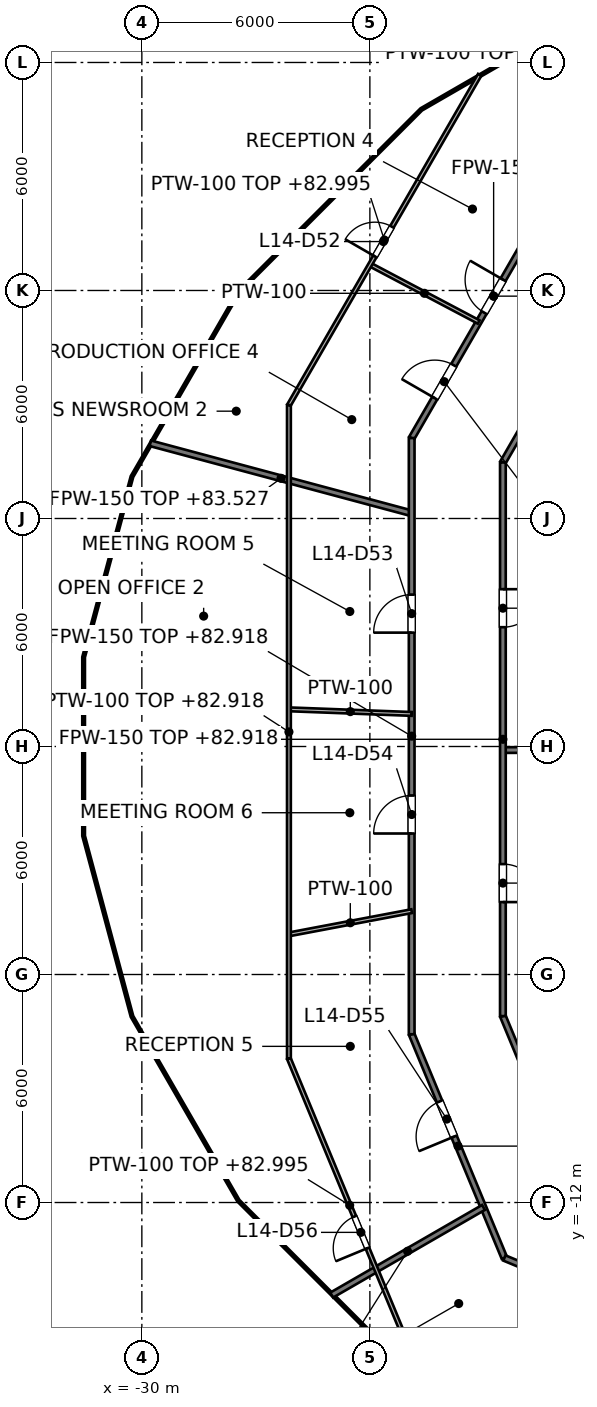
"""IFC4 building model, lengths in metres.
Left out: names, types, materials, properties, quantities, classifications, styles, units other than length and angle.
Written with IfcOpenShell. Run it as: python <this file> out.ifc"""

import sys

from ifc_helpers import new_model, si_unit, direction, frame, frame_2d, origin, place, context, subcontext, project, spatial, rectangle, extrude, element, fill, save


model = new_model("IFC4")
c1 = context("Model", 3, precision=1e-05, world=origin(), true_north=direction((0.0, 1.0)))
c2 = subcontext(c1, "Body", "Model", "MODEL_VIEW")
j1 = project(units=[si_unit("LENGTHUNIT", "METRE"), si_unit("PLANEANGLEUNIT", "RADIAN")], contexts=[c1])
p1 = place(None, origin())
s1 = spatial("IfcSite", under=j1, at=p1, CompositionType="ELEMENT")
p2 = place(p1, origin())
s2 = spatial("IfcBuilding", under=s1, at=p2, CompositionType="ELEMENT")
p3 = place(p2, frame((0.0, 0.0, 79.8)))
s3 = spatial("IfcBuildingStorey", under=s2, at=p3, CompositionType="ELEMENT", Elevation=79.8)
p4 = place(p3, frame((-22.9, -7.572, 0.0), z_axis=(0.0, 0.0, 1.0), x_axis=(0.382860357704, -0.923806227788, 0.0)))
e1 = element("IfcWall", 1, at=p4, inside=s3, PredefinedType="PARTITIONING", context=c2, shape_type="SweptSolid", body=[
    extrude(rectangle(XDim=6.374, YDim=0.15, at=frame_2d((3.187, 0.0))), origin(), (0.0, 0.0, 1.0), 3.195),
])
p5 = place(p4, frame((1.916, 0.0, 0.0)))
e2 = element("IfcOpeningElement", 2, at=p5, cuts=e1, PredefinedType="OPENING", context=c2, shape_type="SweptSolid", body=[
    extrude(rectangle(XDim=1.0, YDim=2.1, at=frame_2d((0.5, 1.05))), frame((0.0, 0.075, 0.0), z_axis=(0.0, -1.0, 0.0), x_axis=(1.0, 0.0, 0.0)), (0.0, 0.0, 1.0), 0.15),
])
p6 = place(p3, frame((-20.5, -7.095, 0.0), z_axis=(0.0, 0.0, 1.0), x_axis=(0.382860567438, -0.923806140866, 0.0)))
e3 = element("IfcWall", 3, at=p6, inside=s3, PredefinedType="PARTITIONING", context=c2, shape_type="SweptSolid", body=[
    extrude(rectangle(XDim=4.902, YDim=0.15, at=frame_2d((2.451, 0.0))), origin(), (0.0, 0.0, 1.0), 3.195),
])
p7 = place(p3, frame((-20.46, -13.46, 0.0), z_axis=(0.0, 0.0, 1.0), x_axis=(0.923801547606, -0.382871650349, 0.0)))
e4 = element("IfcWall", 4, at=p7, inside=s3, PredefinedType="PARTITIONING", context=c2, shape_type="SweptSolid", body=[
    extrude(rectangle(XDim=6.415, YDim=0.15, at=frame_2d((3.208, 0.0))), origin(), (0.0, 0.0, 1.0), 3.195),
])
p8 = place(p7, frame((2.707, 0.0, 0.0)))
e5 = element("IfcOpeningElement", 5, at=p8, cuts=e4, PredefinedType="OPENING", context=c2, shape_type="SweptSolid", body=[
    extrude(rectangle(XDim=1.0, YDim=2.1, at=frame_2d((0.5, 1.05))), frame((0.0, 0.075, 0.0), z_axis=(0.0, -1.0, 0.0), x_axis=(1.0, 0.0, 0.0)), (0.0, 0.0, 1.0), 0.15),
])
p9 = place(p3, frame((-29.777, 7.979, 0.0), z_axis=(0.0, 0.0, 1.0), x_axis=(0.965924632989, -0.25882349852, 0.0)))
e6 = element("IfcWall", 6, at=p9, inside=s3, PredefinedType="PARTITIONING", context=c2, shape_type="SweptSolid", body=[
    extrude(rectangle(XDim=7.12, YDim=0.15, at=frame_2d((3.56, 0.0))), origin(), (0.0, 0.0, 1.0), 3.727),
])
p10 = place(p3, frame((-20.5, -0.094, 0.0), z_axis=(0.0, 0.0, 1.0), x_axis=(0.999990148138, 0.004438876723, 0.0)))
e7 = element("IfcWall", 7, at=p10, inside=s3, PredefinedType="PARTITIONING", context=c2, shape_type="SweptSolid", body=[
    extrude(rectangle(XDim=5.5, YDim=0.15, at=frame_2d((2.75, 0.0))), origin(), (0.0, 0.0, 1.0), 3.195),
])
p11 = place(p3, frame((-25.005, -14.436, 0.0), z_axis=(0.0, 0.0, 1.0), x_axis=(0.866022493768, 0.500005040262, 0.0)))
e8 = element("IfcWall", 8, at=p11, inside=s3, PredefinedType="PARTITIONING", context=c2, shape_type="SweptSolid", body=[
    extrude(rectangle(XDim=4.612, YDim=0.15, at=frame_2d((2.306, 0.0))), origin(), (0.0, 0.0, 1.0), 3.352),
])
p12 = place(p3, frame((-20.5, 7.474, 0.0), z_axis=(0.0, 0.0, 1.0), x_axis=(0.500012665616, 0.866018091164, 0.0)))
e9 = element("IfcWall", 9, at=p12, inside=s3, PredefinedType="PARTITIONING", context=c2, shape_type="SweptSolid", body=[
    extrude(rectangle(XDim=6.602, YDim=0.15, at=frame_2d((3.301, 0.0))), origin(), (0.0, 0.0, 1.0), 3.195),
])
p13 = place(p12, frame((2.803, 0.0, 0.0)))
e10 = element("IfcOpeningElement", 10, at=p13, cuts=e9, PredefinedType="OPENING", context=c2, shape_type="SweptSolid", body=[
    extrude(rectangle(XDim=1.0, YDim=2.1, at=frame_2d((0.5, 1.05))), frame((0.0, 0.075, 0.0), z_axis=(0.0, -1.0, 0.0), x_axis=(1.0, 0.0, 0.0)), (0.0, 0.0, 1.0), 0.15),
])
p14 = place(p3, frame((-22.9, 8.117, 0.0), z_axis=(0.0, 0.0, 1.0), x_axis=(0.499983791763, 0.866034761412, 0.0)))
e11 = element("IfcWall", 11, at=p14, inside=s3, PredefinedType="PARTITIONING", context=c2, shape_type="SweptSolid", body=[
    extrude(rectangle(XDim=8.626, YDim=0.15, at=frame_2d((4.313, 0.0))), origin(), (0.0, 0.0, 1.0), 3.195),
])
p15 = place(p14, frame((3.812, 0.0, 0.0)))
e12 = element("IfcOpeningElement", 12, at=p15, cuts=e11, PredefinedType="OPENING", context=c2, shape_type="SweptSolid", body=[
    extrude(rectangle(XDim=1.0, YDim=2.1, at=frame_2d((0.5, 1.05))), frame((0.0, 0.075, 0.0), z_axis=(0.0, -1.0, 0.0), x_axis=(1.0, 0.0, 0.0)), (0.0, 0.0, 1.0), 0.15),
])
p16 = place(p14, frame((1.213, 0.0, 0.0)))
e13 = element("IfcOpeningElement", 13, at=p16, cuts=e11, PredefinedType="OPENING", context=c2, shape_type="SweptSolid", body=[
    extrude(rectangle(XDim=1.0, YDim=2.1, at=frame_2d((0.5, 1.05))), frame((0.0, 0.075, 0.0), z_axis=(0.0, -1.0, 0.0), x_axis=(1.0, 0.0, 0.0)), (0.0, 0.0, 1.0), 0.15),
])
p17 = place(p3, frame((-20.5, -7.095, 0.0), z_axis=(0.0, 0.0, 1.0), x_axis=(0.0, 1.0, 0.0)))
e14 = element("IfcWall", 14, at=p17, inside=s3, PredefinedType="PARTITIONING", context=c2, shape_type="SweptSolid", body=[
    extrude(rectangle(XDim=14.569, YDim=0.15, at=frame_2d((7.285, 0.0))), origin(), (0.0, 0.0, 1.0), 3.118),
])
p18 = place(p17, frame((10.234, 0.0, 0.0)))
e15 = element("IfcOpeningElement", 15, at=p18, cuts=e14, PredefinedType="OPENING", context=c2, shape_type="SweptSolid", body=[
    extrude(rectangle(XDim=1.0, YDim=2.1, at=frame_2d((0.5, 1.05))), frame((0.0, 0.075, 0.0), z_axis=(0.0, -1.0, 0.0), x_axis=(1.0, 0.0, 0.0)), (0.0, 0.0, 1.0), 0.15),
])
p19 = place(p17, frame((3.0, 0.0, 0.0)))
e16 = element("IfcOpeningElement", 16, at=p19, cuts=e14, PredefinedType="OPENING", context=c2, shape_type="SweptSolid", body=[
    extrude(rectangle(XDim=1.0, YDim=2.1, at=frame_2d((0.5, 1.05))), frame((0.0, 0.075, 0.0), z_axis=(0.0, -1.0, 0.0), x_axis=(1.0, 0.0, 0.0)), (0.0, 0.0, 1.0), 0.15),
])
p20 = place(p3, frame((-22.9, -7.572, 0.0), z_axis=(0.0, 0.0, 1.0), x_axis=(0.0, 1.0, 0.0)))
e17 = element("IfcWall", 17, at=p20, inside=s3, PredefinedType="PARTITIONING", context=c2, shape_type="SweptSolid", body=[
    extrude(rectangle(XDim=15.689, YDim=0.15, at=frame_2d((7.844, 0.0))), origin(), (0.0, 0.0, 1.0), 3.118),
])
p21 = place(p20, frame((10.569, 0.0, 0.0)))
e18 = element("IfcOpeningElement", 18, at=p21, cuts=e17, PredefinedType="OPENING", context=c2, shape_type="SweptSolid", body=[
    extrude(rectangle(XDim=1.0, YDim=2.1, at=frame_2d((0.5, 1.05))), frame((0.0, 0.075, 0.0), z_axis=(0.0, -1.0, 0.0), x_axis=(1.0, 0.0, 0.0)), (0.0, 0.0, 1.0), 0.15),
])
p22 = place(p20, frame((5.282, 0.0, 0.0)))
e19 = element("IfcOpeningElement", 19, at=p22, cuts=e17, PredefinedType="OPENING", context=c2, shape_type="SweptSolid", body=[
    extrude(rectangle(XDim=1.0, YDim=2.1, at=frame_2d((0.5, 1.05))), frame((0.0, 0.075, 0.0), z_axis=(0.0, -1.0, 0.0), x_axis=(1.0, 0.0, 0.0)), (0.0, 0.0, 1.0), 0.15),
])
p23 = place(p3, frame((-26.13, -8.215, 0.0), z_axis=(0.0, 0.0, 1.0), x_axis=(0.382761353451, -0.923847252691, 0.0)))
e20 = element("IfcWall", 20, at=p23, inside=s3, PredefinedType="PARTITIONING", context=c2, shape_type="SweptSolid", body=[
    extrude(rectangle(XDim=8.353, YDim=0.1, at=frame_2d((4.177, 0.0))), origin(), (0.0, 0.0, 1.0), 3.195),
])
p24 = place(p23, frame((4.498, 0.0, 0.0)))
e21 = element("IfcOpeningElement", 21, at=p24, cuts=e20, PredefinedType="OPENING", context=c2, shape_type="SweptSolid", body=[
    extrude(rectangle(XDim=0.9, YDim=2.1, at=frame_2d((0.45, 1.05))), frame((0.0, 0.05, 0.0), z_axis=(0.0, -1.0, 0.0), x_axis=(1.0, 0.0, 0.0)), (0.0, 0.0, 1.0), 0.1),
])
p25 = place(p3, frame((-23.994, 12.681, 0.0), z_axis=(0.0, 0.0, 1.0), x_axis=(0.884105641911, -0.467287078723, 0.0)))
e22 = element("IfcWall", 22, at=p25, inside=s3, PredefinedType="PARTITIONING", context=c2, shape_type="SweptSolid", body=[
    extrude(rectangle(XDim=3.231, YDim=0.1, at=frame_2d((1.616, 0.0))), origin(), (0.0, 0.0, 1.0), 4.05),
])
p26 = place(p3, frame((-26.13, 0.978, 0.0), z_axis=(0.0, 0.0, 1.0), x_axis=(0.999297969227, -0.037464232255, 0.0)))
e23 = element("IfcWall", 23, at=p26, inside=s3, PredefinedType="PARTITIONING", context=c2, shape_type="SweptSolid", body=[
    extrude(rectangle(XDim=3.232, YDim=0.1, at=frame_2d((1.616, 0.0))), origin(), (0.0, 0.0, 1.0), 4.05),
])
p27 = place(p3, frame((-26.13, -4.944, 0.0), z_axis=(0.0, 0.0, 1.0), x_axis=(0.982569879067, 0.185893605994, 0.0)))
e24 = element("IfcWall", 24, at=p27, inside=s3, PredefinedType="PARTITIONING", context=c2, shape_type="SweptSolid", body=[
    extrude(rectangle(XDim=3.287, YDim=0.1, at=frame_2d((1.644, 0.0))), origin(), (0.0, 0.0, 1.0), 4.05),
])
p28 = place(p3, frame((-26.13, 8.983, 0.0), z_axis=(0.0, 0.0, 1.0), x_axis=(0.500107000949, 0.865963617944, 0.0)))
e25 = element("IfcWall", 25, at=p28, inside=s3, PredefinedType="PARTITIONING", context=c2, shape_type="SweptSolid", body=[
    extrude(rectangle(XDim=10.038, YDim=0.1, at=frame_2d((5.019, 0.0))), origin(), (0.0, 0.0, 1.0), 3.195),
])
p29 = place(p28, frame((4.521, 0.0, 0.0)))
e26 = element("IfcOpeningElement", 26, at=p29, cuts=e25, PredefinedType="OPENING", context=c2, shape_type="SweptSolid", body=[
    extrude(rectangle(XDim=0.9, YDim=2.1, at=frame_2d((0.45, 1.05))), frame((0.0, 0.05, 0.0), z_axis=(0.0, -1.0, 0.0), x_axis=(1.0, 0.0, 0.0)), (0.0, 0.0, 1.0), 0.1),
])
p30 = place(p3, frame((-26.13, -8.215, 0.0), z_axis=(0.0, 0.0, 1.0), x_axis=(0.0, 1.0, 0.0)))
e27 = element("IfcWall", 27, at=p30, inside=s3, PredefinedType="PARTITIONING", context=c2, shape_type="SweptSolid", body=[
    extrude(rectangle(XDim=17.198, YDim=0.1, at=frame_2d((8.599, 0.0))), origin(), (0.0, 0.0, 1.0), 3.118),
])
p31 = place(p18, origin())
e28 = element("IfcDoor", 28, at=p31, inside=s3, OperationType="SINGLE_SWING_RIGHT", PredefinedType="DOOR", context=c2, shape_type="SweptSolid", body=[
    extrude(rectangle(XDim=1.0, YDim=2.1, at=frame_2d((0.5, 1.05))), frame((0.0, 0.025, 0.0), z_axis=(0.0, -1.0, 0.0), x_axis=(1.0, 0.0, 0.0)), (0.0, 0.0, 1.0), 0.05),
])
fill(e15, e28)
p32 = place(p19, origin())
e29 = element("IfcDoor", 29, at=p32, inside=s3, OperationType="SINGLE_SWING_LEFT", PredefinedType="DOOR", context=c2, shape_type="SweptSolid", body=[
    extrude(rectangle(XDim=1.0, YDim=2.1, at=frame_2d((0.5, 1.05))), frame((0.0, 0.025, 0.0), z_axis=(0.0, -1.0, 0.0), x_axis=(1.0, 0.0, 0.0)), (0.0, 0.0, 1.0), 0.05),
])
fill(e16, e29)
p33 = place(p15, origin())
e30 = element("IfcDoor", 30, at=p33, inside=s3, OperationType="SINGLE_SWING_RIGHT", PredefinedType="DOOR", context=c2, shape_type="SweptSolid", body=[
    extrude(rectangle(XDim=1.0, YDim=2.1, at=frame_2d((0.5, 1.05))), frame((0.0, 0.025, 0.0), z_axis=(0.0, -1.0, 0.0), x_axis=(1.0, 0.0, 0.0)), (0.0, 0.0, 1.0), 0.05),
])
fill(e12, e30)
p34 = place(p16, origin())
e31 = element("IfcDoor", 31, at=p34, inside=s3, OperationType="SINGLE_SWING_LEFT", PredefinedType="DOOR", context=c2, shape_type="SweptSolid", body=[
    extrude(rectangle(XDim=1.0, YDim=2.1, at=frame_2d((0.5, 1.05))), frame((0.0, 0.025, 0.0), z_axis=(0.0, -1.0, 0.0), x_axis=(1.0, 0.0, 0.0)), (0.0, 0.0, 1.0), 0.05),
])
fill(e13, e31)
p35 = place(p29, origin())
e32 = element("IfcDoor", 32, at=p35, inside=s3, OperationType="SINGLE_SWING_LEFT", PredefinedType="DOOR", context=c2, shape_type="SweptSolid", body=[
    extrude(rectangle(XDim=0.9, YDim=2.1, at=frame_2d((0.45, 1.05))), frame((0.0, 0.025, 0.0), z_axis=(0.0, -1.0, 0.0), x_axis=(1.0, 0.0, 0.0)), (0.0, 0.0, 1.0), 0.05),
])
fill(e26, e32)
p36 = place(p21, origin())
e33 = element("IfcDoor", 33, at=p36, inside=s3, OperationType="SINGLE_SWING_LEFT", PredefinedType="DOOR", context=c2, shape_type="SweptSolid", body=[
    extrude(rectangle(XDim=1.0, YDim=2.1, at=frame_2d((0.5, 1.05))), frame((0.0, 0.025, 0.0), z_axis=(0.0, -1.0, 0.0), x_axis=(1.0, 0.0, 0.0)), (0.0, 0.0, 1.0), 0.05),
])
fill(e18, e33)
p37 = place(p22, origin())
e34 = element("IfcDoor", 34, at=p37, inside=s3, OperationType="SINGLE_SWING_LEFT", PredefinedType="DOOR", context=c2, shape_type="SweptSolid", body=[
    extrude(rectangle(XDim=1.0, YDim=2.1, at=frame_2d((0.5, 1.05))), frame((0.0, 0.025, 0.0), z_axis=(0.0, -1.0, 0.0), x_axis=(1.0, 0.0, 0.0)), (0.0, 0.0, 1.0), 0.05),
])
fill(e19, e34)
p38 = place(p5, origin())
e35 = element("IfcDoor", 35, at=p38, inside=s3, OperationType="SINGLE_SWING_RIGHT", PredefinedType="DOOR", context=c2, shape_type="SweptSolid", body=[
    extrude(rectangle(XDim=1.0, YDim=2.1, at=frame_2d((0.5, 1.05))), frame((0.0, 0.025, 0.0), z_axis=(0.0, -1.0, 0.0), x_axis=(1.0, 0.0, 0.0)), (0.0, 0.0, 1.0), 0.05),
])
fill(e2, e35)
p39 = place(p24, origin())
e36 = element("IfcDoor", 36, at=p39, inside=s3, OperationType="SINGLE_SWING_RIGHT", PredefinedType="DOOR", context=c2, shape_type="SweptSolid", body=[
    extrude(rectangle(XDim=0.9, YDim=2.1, at=frame_2d((0.45, 1.05))), frame((0.0, 0.025, 0.0), z_axis=(0.0, -1.0, 0.0), x_axis=(1.0, 0.0, 0.0)), (0.0, 0.0, 1.0), 0.05),
])
fill(e21, e36)
save(model, sys.argv[1])
